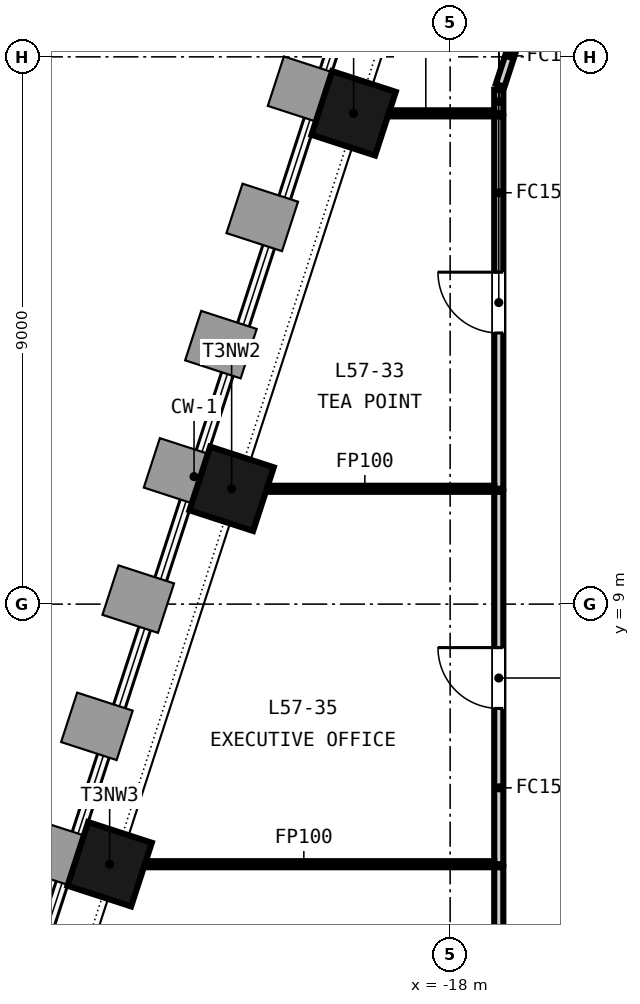
"""IFC4 building model, lengths in metres.
Left out: names, types, materials, properties, quantities, classifications, styles, units other than length and angle.
Written with IfcOpenShell. Run it as: python <this file> out.ifc"""

import sys

from ifc_helpers import new_model, si_unit, direction, frame, frame_2d, origin, origin_2d, place, context, subcontext, project, spatial, rectangle, extrude, element, fill, save


model = new_model("IFC4")
c1 = context("Model", 3, precision=1e-05, world=origin(), true_north=direction((0.0, 1.0)))
c2 = subcontext(c1, "Body", "Model", "MODEL_VIEW")
j1 = project(units=[si_unit("LENGTHUNIT", "METRE"), si_unit("PLANEANGLEUNIT", "RADIAN")], contexts=[c1])
p1 = place(None, origin())
s1 = spatial("IfcSite", under=j1, at=p1, CompositionType="ELEMENT")
p2 = place(p1, origin())
s2 = spatial("IfcBuilding", under=s1, at=p2, CompositionType="ELEMENT")
p3 = place(p2, frame((0.0, 0.0, 227.25)))
s3 = spatial("IfcBuildingStorey", under=s2, at=p3, CompositionType="ELEMENT", Elevation=227.25)
for number, where, z_axis, x_axis in (
    (1, (-19.587, 17.071, -0.15), (0.0, 0.0, 1.0), (-0.309, -0.951, 0.0)),
    (2, (-21.593, 10.897, -0.15), (0.0, 0.0, 1.0), (-0.309, -0.951, 0.0)),
    (3, (-23.599, 4.723, -0.15), (0.0, 0.0, 1.0), (-0.309, -0.951, 0.0)),
):
    element("IfcColumn", number, at=place(p3, frame(where, z_axis=z_axis, x_axis=x_axis)), inside=s3, PredefinedType="COLUMN", context=c2, shape_type="SweptSolid", body=[
        extrude(rectangle(XDim=1.1, YDim=1.1, at=origin_2d()), origin(), (0.0, 0.0, 1.0), 3.65),
    ])
p4 = place(p3, frame((-17.2, 17.071, 0.0), z_axis=(0.0, 0.0, 1.0), x_axis=(0.0, 1.0, 0.0)))
e4 = element("IfcWall", 4, at=p4, inside=s3, PredefinedType="PARTITIONING", context=c2, shape_type="SweptSolid", body=[
    extrude(rectangle(XDim=0.389, YDim=0.15, at=frame_2d((0.194, 0.0))), origin(), (0.0, 0.0, 1.0), 2.751),
])
p5 = place(p3, frame((-17.177, 17.531, 0.0), z_axis=(0.0, 0.0, 1.0), x_axis=(0.30895599646, 0.951076333556, 0.0)))
e5 = element("IfcWall", 5, at=p5, inside=s3, PredefinedType="PARTITIONING", context=c2, shape_type="SweptSolid", body=[
    extrude(rectangle(XDim=1.019, YDim=0.15, at=frame_2d((0.509, 0.0))), origin(), (0.0, 0.0, 1.0), 2.751),
])
p6 = place(p3, frame((-19.535, 17.071, 0.0), z_axis=(0.0, 0.0, 1.0), x_axis=(1.0, 0.0, 0.0)))
e6 = element("IfcWall", 6, at=p6, inside=s3, PredefinedType="PARTITIONING", context=c2, shape_type="SweptSolid", body=[
    extrude(rectangle(XDim=2.26, YDim=0.1, at=frame_2d((1.13, 0.0))), origin(), (0.0, 0.0, 1.0), 2.751),
])
p7 = place(p3, frame((-17.2, 10.897, 0.0), z_axis=(0.0, 0.0, 1.0), x_axis=(0.0, 1.0, 0.0)))
e7 = element("IfcWall", 7, at=p7, inside=s3, PredefinedType="PARTITIONING", context=c2, shape_type="SweptSolid", body=[
    extrude(rectangle(XDim=6.124, YDim=0.15, at=frame_2d((3.062, 0.0))), origin(), (0.0, 0.0, 1.0), 2.751),
])
p8 = place(p7, frame((2.562, 0.0, 0.0)))
e8 = element("IfcOpeningElement", 8, at=p8, cuts=e7, PredefinedType="OPENING", context=c2, shape_type="SweptSolid", body=[
    extrude(rectangle(XDim=1.0, YDim=2.1, at=frame_2d((0.5, 1.05))), frame((0.0, 0.085, 0.0), z_axis=(0.0, -1.0, 0.0), x_axis=(1.0, 0.0, 0.0)), (0.0, 0.0, 1.0), 0.17),
])
p9 = place(p3, frame((-21.541, 10.897, 0.0), z_axis=(0.0, 0.0, 1.0), x_axis=(1.0, 0.0, 0.0)))
e9 = element("IfcWall", 9, at=p9, inside=s3, PredefinedType="PARTITIONING", context=c2, shape_type="SweptSolid", body=[
    extrude(rectangle(XDim=4.266, YDim=0.1, at=frame_2d((2.133, 0.0))), origin(), (0.0, 0.0, 1.0), 2.751),
])
p10 = place(p3, frame((-17.2, 4.723, 0.0), z_axis=(0.0, 0.0, 1.0), x_axis=(0.0, 1.0, 0.0)))
e10 = element("IfcWall", 10, at=p10, inside=s3, PredefinedType="PARTITIONING", context=c2, shape_type="SweptSolid", body=[
    extrude(rectangle(XDim=6.124, YDim=0.15, at=frame_2d((3.062, 0.0))), origin(), (0.0, 0.0, 1.0), 2.751),
])
p11 = place(p10, frame((2.562, 0.0, 0.0)))
e11 = element("IfcOpeningElement", 11, at=p11, cuts=e10, PredefinedType="OPENING", context=c2, shape_type="SweptSolid", body=[
    extrude(rectangle(XDim=1.0, YDim=2.1, at=frame_2d((0.5, 1.05))), frame((0.0, 0.085, 0.0), z_axis=(0.0, -1.0, 0.0), x_axis=(1.0, 0.0, 0.0)), (0.0, 0.0, 1.0), 0.17),
])
p12 = place(p3, frame((-23.547, 4.723, 0.0), z_axis=(0.0, 0.0, 1.0), x_axis=(1.0, 0.0, 0.0)))
e12 = element("IfcWall", 12, at=p12, inside=s3, PredefinedType="PARTITIONING", context=c2, shape_type="SweptSolid", body=[
    extrude(rectangle(XDim=6.272, YDim=0.1, at=frame_2d((3.136, 0.0))), origin(), (0.0, 0.0, 1.0), 2.751),
])
p13 = place(p3, frame((-17.2, -2.925, 0.0), z_axis=(0.0, 0.0, 1.0), x_axis=(0.0, 1.0, 0.0)))
e13 = element("IfcWall", 13, at=p13, inside=s3, PredefinedType="PARTITIONING", context=c2, shape_type="SweptSolid", body=[
    extrude(rectangle(XDim=7.598, YDim=0.15, at=frame_2d((3.799, 0.0))), origin(), (0.0, 0.0, 1.0), 2.751),
])
p14 = place(p13, frame((2.899, 0.0, 0.0)))
e14 = element("IfcOpeningElement", 14, at=p14, cuts=e13, PredefinedType="OPENING", context=c2, shape_type="SweptSolid", body=[
    extrude(rectangle(XDim=1.8, YDim=2.1, at=frame_2d((0.9, 1.05))), frame((0.0, 0.085, 0.0), z_axis=(0.0, -1.0, 0.0), x_axis=(1.0, 0.0, 0.0)), (0.0, 0.0, 1.0), 0.17),
])
p15 = place(p8, origin())
e15 = element("IfcDoor", 15, at=p15, inside=s3, OperationType="SINGLE_SWING_RIGHT", PredefinedType="DOOR", context=c2, shape_type="SweptSolid", body=[
    extrude(rectangle(XDim=1.0, YDim=2.1, at=frame_2d((0.5, 1.05))), frame((0.0, 0.025, 0.0), z_axis=(0.0, -1.0, 0.0), x_axis=(1.0, 0.0, 0.0)), (0.0, 0.0, 1.0), 0.05),
])
fill(e8, e15)
p16 = place(p11, origin())
e16 = element("IfcDoor", 16, at=p16, inside=s3, OperationType="SINGLE_SWING_RIGHT", PredefinedType="DOOR", context=c2, shape_type="SweptSolid", body=[
    extrude(rectangle(XDim=1.0, YDim=2.1, at=frame_2d((0.5, 1.05))), frame((0.0, 0.025, 0.0), z_axis=(0.0, -1.0, 0.0), x_axis=(1.0, 0.0, 0.0)), (0.0, 0.0, 1.0), 0.05),
])
fill(e11, e16)
save(model, sys.argv[1])
